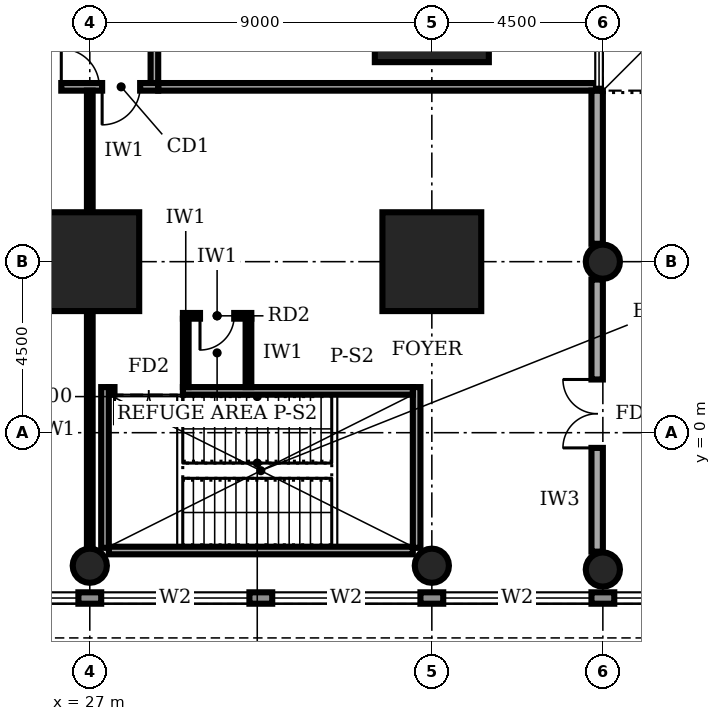
"""IFC4 building model, lengths in metres.
Left out: names, types, materials, properties, quantities, classifications, styles, units other than length and angle.
Written with IfcOpenShell. Run it as: python <this file> out.ifc"""

import sys

from ifc_helpers import new_model, si_unit, direction, frame, frame_2d, origin, origin_2d, place, context, subcontext, project, spatial, rectangle, circle, extrude, element, fill, save


model = new_model("IFC4")
c1 = context("Model", 3, precision=1e-05, world=origin(), true_north=direction((0.0, 1.0)))
c2 = subcontext(c1, "Body", "Model", "MODEL_VIEW")
j1 = project(units=[si_unit("LENGTHUNIT", "METRE"), si_unit("PLANEANGLEUNIT", "RADIAN")], contexts=[c1])
p1 = place(None, origin())
s1 = spatial("IfcSite", under=j1, at=p1, CompositionType="ELEMENT")
p2 = place(p1, origin())
s2 = spatial("IfcBuilding", under=s1, at=p2, CompositionType="ELEMENT")
p3 = place(p2, frame((0.0, 0.0, 6.0)))
s3 = spatial("IfcBuildingStorey", under=s2, at=p3, CompositionType="ELEMENT", Elevation=6.0)
for number, where, z_axis, x_axis in (
    (1, (27.0, 4.5, 0.0), (0.0, 0.0, 1.0), (1.0, 0.0, 0.0)),
    (2, (36.0, 4.5, 0.0), (0.0, 0.0, 1.0), (1.0, 0.0, 0.0)),
):
    element("IfcColumn", number, at=place(p3, frame(where, z_axis=z_axis, x_axis=x_axis)), inside=s3, PredefinedType="COLUMN", context=c2, shape_type="SweptSolid", body=[
        extrude(rectangle(XDim=2.6, YDim=2.6, at=origin_2d()), origin(), (0.0, 0.0, 1.0), 5.0),
    ])
p4 = place(p3, frame((36.0, 11.25, 0.0), z_axis=(0.0, 0.0, 1.0), x_axis=(1.0, 0.0, 0.0)))
e3 = element("IfcColumn", 3, at=p4, inside=s3, PredefinedType="COLUMN", context=c2, shape_type="SweptSolid", body=[
    extrude(rectangle(XDim=3.0, YDim=3.0, at=origin_2d()), origin(), (0.0, 0.0, 1.0), 5.0),
])
for number, where, z_axis, x_axis in (
    (4, (27.0, -3.5, 0.0), (0.0, 0.0, 1.0), (1.0, 0.0, 0.0)),
    (5, (36.0, -3.5, 0.0), (0.0, 0.0, 1.0), (1.0, 0.0, 0.0)),
    (6, (40.5, -3.6, 0.0), (0.0, 0.0, 1.0), (1.0, 0.0, 0.0)),
    (7, (40.5, 4.5, 0.0), (0.0, 0.0, 1.0), (1.0, 0.0, 0.0)),
):
    element("IfcColumn", number, at=place(p3, frame(where, z_axis=z_axis, x_axis=x_axis)), inside=s3, PredefinedType="COLUMN", context=c2, shape_type="SweptSolid", body=[
        extrude(circle(Radius=0.45, at=origin_2d()), origin(), (0.0, 0.0, 1.0), 5.0),
    ])
p5 = place(p3, frame((0.02, -4.35, 0.0), z_axis=(0.0, 0.0, 1.0), x_axis=(1.0, 0.0, 0.0)))
e8 = element("IfcWall", 8, at=p5, inside=s3, PredefinedType="STANDARD", context=c2, shape_type="SweptSolid", body=[
    extrude(rectangle(XDim=98.96, YDim=0.3, at=frame_2d((49.48, 0.0))), origin(), (0.0, 0.0, 1.0), 4.7),
])
p6 = place(p5, frame((4.78, 0.0, 0.6)))
e9 = element("IfcOpeningElement", 9, at=p6, cuts=e8, PredefinedType="OPENING", context=c2, shape_type="SweptSolid", body=[
    extrude(rectangle(XDim=3.9, YDim=2.6, at=frame_2d((1.95, 1.3))), frame((0.0, 0.16, 0.0), z_axis=(0.0, -1.0, 0.0), x_axis=(1.0, 0.0, 0.0)), (0.0, 0.0, 1.0), 0.32),
])
p7 = place(p5, frame((9.28, 0.0, 0.6)))
e10 = element("IfcOpeningElement", 10, at=p7, cuts=e8, PredefinedType="OPENING", context=c2, shape_type="SweptSolid", body=[
    extrude(rectangle(XDim=3.9, YDim=2.6, at=frame_2d((1.95, 1.3))), frame((0.0, 0.16, 0.0), z_axis=(0.0, -1.0, 0.0), x_axis=(1.0, 0.0, 0.0)), (0.0, 0.0, 1.0), 0.32),
])
p8 = place(p5, frame((13.78, 0.0, 0.6)))
e11 = element("IfcOpeningElement", 11, at=p8, cuts=e8, PredefinedType="OPENING", context=c2, shape_type="SweptSolid", body=[
    extrude(rectangle(XDim=3.9, YDim=2.6, at=frame_2d((1.95, 1.3))), frame((0.0, 0.16, 0.0), z_axis=(0.0, -1.0, 0.0), x_axis=(1.0, 0.0, 0.0)), (0.0, 0.0, 1.0), 0.32),
])
p9 = place(p5, frame((18.28, 0.0, 0.6)))
e12 = element("IfcOpeningElement", 12, at=p9, cuts=e8, PredefinedType="OPENING", context=c2, shape_type="SweptSolid", body=[
    extrude(rectangle(XDim=3.9, YDim=2.6, at=frame_2d((1.95, 1.3))), frame((0.0, 0.16, 0.0), z_axis=(0.0, -1.0, 0.0), x_axis=(1.0, 0.0, 0.0)), (0.0, 0.0, 1.0), 0.32),
])
p10 = place(p5, frame((22.78, 0.0, 0.6)))
e13 = element("IfcOpeningElement", 13, at=p10, cuts=e8, PredefinedType="OPENING", context=c2, shape_type="SweptSolid", body=[
    extrude(rectangle(XDim=3.9, YDim=2.6, at=frame_2d((1.95, 1.3))), frame((0.0, 0.16, 0.0), z_axis=(0.0, -1.0, 0.0), x_axis=(1.0, 0.0, 0.0)), (0.0, 0.0, 1.0), 0.32),
])
p11 = place(p5, frame((27.28, 0.0, 0.6)))
e14 = element("IfcOpeningElement", 14, at=p11, cuts=e8, PredefinedType="OPENING", context=c2, shape_type="SweptSolid", body=[
    extrude(rectangle(XDim=3.9, YDim=2.6, at=frame_2d((1.95, 1.3))), frame((0.0, 0.16, 0.0), z_axis=(0.0, -1.0, 0.0), x_axis=(1.0, 0.0, 0.0)), (0.0, 0.0, 1.0), 0.32),
])
p12 = place(p5, frame((31.78, 0.0, 0.6)))
e15 = element("IfcOpeningElement", 15, at=p12, cuts=e8, PredefinedType="OPENING", context=c2, shape_type="SweptSolid", body=[
    extrude(rectangle(XDim=3.9, YDim=2.6, at=frame_2d((1.95, 1.3))), frame((0.0, 0.16, 0.0), z_axis=(0.0, -1.0, 0.0), x_axis=(1.0, 0.0, 0.0)), (0.0, 0.0, 1.0), 0.32),
])
p13 = place(p5, frame((36.28, 0.0, 0.6)))
e16 = element("IfcOpeningElement", 16, at=p13, cuts=e8, PredefinedType="OPENING", context=c2, shape_type="SweptSolid", body=[
    extrude(rectangle(XDim=3.9, YDim=2.6, at=frame_2d((1.95, 1.3))), frame((0.0, 0.16, 0.0), z_axis=(0.0, -1.0, 0.0), x_axis=(1.0, 0.0, 0.0)), (0.0, 0.0, 1.0), 0.32),
])
p14 = place(p5, frame((40.78, 0.0, 0.6)))
e17 = element("IfcOpeningElement", 17, at=p14, cuts=e8, PredefinedType="OPENING", context=c2, shape_type="SweptSolid", body=[
    extrude(rectangle(XDim=3.9, YDim=2.6, at=frame_2d((1.95, 1.3))), frame((0.0, 0.16, 0.0), z_axis=(0.0, -1.0, 0.0), x_axis=(1.0, 0.0, 0.0)), (0.0, 0.0, 1.0), 0.32),
])
p15 = place(p5, frame((45.28, 0.0, 0.6)))
e18 = element("IfcOpeningElement", 18, at=p15, cuts=e8, PredefinedType="OPENING", context=c2, shape_type="SweptSolid", body=[
    extrude(rectangle(XDim=3.9, YDim=2.6, at=frame_2d((1.95, 1.3))), frame((0.0, 0.16, 0.0), z_axis=(0.0, -1.0, 0.0), x_axis=(1.0, 0.0, 0.0)), (0.0, 0.0, 1.0), 0.32),
])
p16 = place(p5, frame((49.78, 0.0, 0.6)))
e19 = element("IfcOpeningElement", 19, at=p16, cuts=e8, PredefinedType="OPENING", context=c2, shape_type="SweptSolid", body=[
    extrude(rectangle(XDim=3.9, YDim=2.6, at=frame_2d((1.95, 1.3))), frame((0.0, 0.16, 0.0), z_axis=(0.0, -1.0, 0.0), x_axis=(1.0, 0.0, 0.0)), (0.0, 0.0, 1.0), 0.32),
])
p17 = place(p5, frame((54.28, 0.0, 0.6)))
e20 = element("IfcOpeningElement", 20, at=p17, cuts=e8, PredefinedType="OPENING", context=c2, shape_type="SweptSolid", body=[
    extrude(rectangle(XDim=3.9, YDim=2.6, at=frame_2d((1.95, 1.3))), frame((0.0, 0.16, 0.0), z_axis=(0.0, -1.0, 0.0), x_axis=(1.0, 0.0, 0.0)), (0.0, 0.0, 1.0), 0.32),
])
p18 = place(p5, frame((58.78, 0.0, 0.6)))
e21 = element("IfcOpeningElement", 21, at=p18, cuts=e8, PredefinedType="OPENING", context=c2, shape_type="SweptSolid", body=[
    extrude(rectangle(XDim=3.9, YDim=2.6, at=frame_2d((1.95, 1.3))), frame((0.0, 0.16, 0.0), z_axis=(0.0, -1.0, 0.0), x_axis=(1.0, 0.0, 0.0)), (0.0, 0.0, 1.0), 0.32),
])
p19 = place(p5, frame((63.28, 0.0, 0.6)))
e22 = element("IfcOpeningElement", 22, at=p19, cuts=e8, PredefinedType="OPENING", context=c2, shape_type="SweptSolid", body=[
    extrude(rectangle(XDim=3.9, YDim=2.6, at=frame_2d((1.95, 1.3))), frame((0.0, 0.16, 0.0), z_axis=(0.0, -1.0, 0.0), x_axis=(1.0, 0.0, 0.0)), (0.0, 0.0, 1.0), 0.32),
])
p20 = place(p5, frame((67.78, 0.0, 0.6)))
e23 = element("IfcOpeningElement", 23, at=p20, cuts=e8, PredefinedType="OPENING", context=c2, shape_type="SweptSolid", body=[
    extrude(rectangle(XDim=3.9, YDim=2.6, at=frame_2d((1.95, 1.3))), frame((0.0, 0.16, 0.0), z_axis=(0.0, -1.0, 0.0), x_axis=(1.0, 0.0, 0.0)), (0.0, 0.0, 1.0), 0.32),
])
p21 = place(p5, frame((72.28, 0.0, 0.6)))
e24 = element("IfcOpeningElement", 24, at=p21, cuts=e8, PredefinedType="OPENING", context=c2, shape_type="SweptSolid", body=[
    extrude(rectangle(XDim=3.9, YDim=2.6, at=frame_2d((1.95, 1.3))), frame((0.0, 0.16, 0.0), z_axis=(0.0, -1.0, 0.0), x_axis=(1.0, 0.0, 0.0)), (0.0, 0.0, 1.0), 0.32),
])
p22 = place(p5, frame((76.78, 0.0, 0.6)))
e25 = element("IfcOpeningElement", 25, at=p22, cuts=e8, PredefinedType="OPENING", context=c2, shape_type="SweptSolid", body=[
    extrude(rectangle(XDim=3.9, YDim=2.6, at=frame_2d((1.95, 1.3))), frame((0.0, 0.16, 0.0), z_axis=(0.0, -1.0, 0.0), x_axis=(1.0, 0.0, 0.0)), (0.0, 0.0, 1.0), 0.32),
])
p23 = place(p5, frame((81.28, 0.0, 0.6)))
e26 = element("IfcOpeningElement", 26, at=p23, cuts=e8, PredefinedType="OPENING", context=c2, shape_type="SweptSolid", body=[
    extrude(rectangle(XDim=3.9, YDim=2.6, at=frame_2d((1.95, 1.3))), frame((0.0, 0.16, 0.0), z_axis=(0.0, -1.0, 0.0), x_axis=(1.0, 0.0, 0.0)), (0.0, 0.0, 1.0), 0.32),
])
p24 = place(p5, frame((85.78, 0.0, 0.6)))
e27 = element("IfcOpeningElement", 27, at=p24, cuts=e8, PredefinedType="OPENING", context=c2, shape_type="SweptSolid", body=[
    extrude(rectangle(XDim=3.9, YDim=2.6, at=frame_2d((1.95, 1.3))), frame((0.0, 0.16, 0.0), z_axis=(0.0, -1.0, 0.0), x_axis=(1.0, 0.0, 0.0)), (0.0, 0.0, 1.0), 0.32),
])
p25 = place(p5, frame((90.28, 0.0, 0.6)))
e28 = element("IfcOpeningElement", 28, at=p25, cuts=e8, PredefinedType="OPENING", context=c2, shape_type="SweptSolid", body=[
    extrude(rectangle(XDim=3.9, YDim=2.6, at=frame_2d((1.95, 1.3))), frame((0.0, 0.16, 0.0), z_axis=(0.0, -1.0, 0.0), x_axis=(1.0, 0.0, 0.0)), (0.0, 0.0, 1.0), 0.32),
])
p26 = place(p5, frame((94.78, 0.0, 0.6)))
e29 = element("IfcOpeningElement", 29, at=p26, cuts=e8, PredefinedType="OPENING", context=c2, shape_type="SweptSolid", body=[
    extrude(rectangle(XDim=3.9, YDim=2.6, at=frame_2d((1.95, 1.3))), frame((0.0, 0.16, 0.0), z_axis=(0.0, -1.0, 0.0), x_axis=(1.0, 0.0, 0.0)), (0.0, 0.0, 1.0), 0.32),
])
p27 = place(p3, frame((11.9, 9.1, 0.0), z_axis=(0.0, 0.0, 1.0), x_axis=(1.0, 0.0, 0.0)))
e30 = element("IfcWall", 30, at=p27, inside=s3, PredefinedType="SOLIDWALL", context=c2, shape_type="SweptSolid", body=[
    extrude(rectangle(XDim=16.9, YDim=0.2, at=frame_2d((8.45, 0.0))), origin(), (0.0, 0.0, 1.0), 4.7),
])
p28 = place(p27, frame((0.1, 0.0, 0.0)))
e31 = element("IfcOpeningElement", 31, at=p28, cuts=e30, PredefinedType="OPENING", context=c2, shape_type="SweptSolid", body=[
    extrude(rectangle(XDim=1.2, YDim=2.4, at=frame_2d((0.6, 1.2))), frame((0.0, 0.11, 0.0), z_axis=(0.0, -1.0, 0.0), x_axis=(1.0, 0.0, 0.0)), (0.0, 0.0, 1.0), 0.22),
])
p29 = place(p27, frame((2.35, 0.0, 0.0)))
e32 = element("IfcOpeningElement", 32, at=p29, cuts=e30, PredefinedType="OPENING", context=c2, shape_type="SweptSolid", body=[
    extrude(rectangle(XDim=2.0, YDim=2.4, at=frame_2d((1.0, 1.2))), frame((0.0, 0.11, 0.0), z_axis=(0.0, -1.0, 0.0), x_axis=(1.0, 0.0, 0.0)), (0.0, 0.0, 1.0), 0.22),
])
p30 = place(p27, frame((12.35, 0.0, 0.0)))
e33 = element("IfcOpeningElement", 33, at=p30, cuts=e30, PredefinedType="OPENING", context=c2, shape_type="SweptSolid", body=[
    extrude(rectangle(XDim=2.0, YDim=2.4, at=frame_2d((1.0, 1.2))), frame((0.0, 0.11, 0.0), z_axis=(0.0, -1.0, 0.0), x_axis=(1.0, 0.0, 0.0)), (0.0, 0.0, 1.0), 0.22),
])
p31 = place(p27, frame((15.425, 0.0, 0.0)))
e34 = element("IfcOpeningElement", 34, at=p31, cuts=e30, PredefinedType="OPENING", context=c2, shape_type="SweptSolid", body=[
    extrude(rectangle(XDim=1.0, YDim=2.1, at=frame_2d((0.5, 1.05))), frame((0.0, 0.11, 0.0), z_axis=(0.0, -1.0, 0.0), x_axis=(1.0, 0.0, 0.0)), (0.0, 0.0, 1.0), 0.22),
])
p32 = place(p3, frame((28.7, 9.2, 0.0), z_axis=(0.0, 0.0, 1.0), x_axis=(0.0, 1.0, 0.0)))
e35 = element("IfcWall", 35, at=p32, inside=s3, PredefinedType="SOLIDWALL", context=c2, shape_type="SweptSolid", body=[
    extrude(rectangle(XDim=22.3, YDim=0.2, at=frame_2d((11.15, 0.0))), origin(), (0.0, 0.0, 1.0), 4.7),
])
p33 = place(p32, frame((1.55, 0.0, 0.0)))
e36 = element("IfcOpeningElement", 36, at=p33, cuts=e35, PredefinedType="OPENING", context=c2, shape_type="SweptSolid", body=[
    extrude(rectangle(XDim=1.0, YDim=2.1, at=frame_2d((0.5, 1.05))), frame((0.0, 0.11, 0.0), z_axis=(0.0, -1.0, 0.0), x_axis=(1.0, 0.0, 0.0)), (0.0, 0.0, 1.0), 0.22),
])
p34 = place(p32, frame((7.9, 0.0, 0.0)))
e37 = element("IfcOpeningElement", 37, at=p34, cuts=e35, PredefinedType="OPENING", context=c2, shape_type="SweptSolid", body=[
    extrude(rectangle(XDim=1.8, YDim=2.1, at=frame_2d((0.9, 1.05))), frame((0.0, 0.11, 0.0), z_axis=(0.0, -1.0, 0.0), x_axis=(1.0, 0.0, 0.0)), (0.0, 0.0, 1.0), 0.22),
])
p35 = place(p32, frame((16.9, 0.0, 0.0)))
e38 = element("IfcOpeningElement", 38, at=p35, cuts=e35, PredefinedType="OPENING", context=c2, shape_type="SweptSolid", body=[
    extrude(rectangle(XDim=1.8, YDim=2.1, at=frame_2d((0.9, 1.05))), frame((0.0, 0.11, 0.0), z_axis=(0.0, -1.0, 0.0), x_axis=(1.0, 0.0, 0.0)), (0.0, 0.0, 1.0), 0.22),
])
p36 = place(p3, frame((28.8, 9.1, 0.0), z_axis=(0.0, 0.0, 1.0), x_axis=(1.0, 0.0, 0.0)))
e39 = element("IfcWall", 39, at=p36, inside=s3, PredefinedType="SOLIDWALL", context=c2, shape_type="SweptSolid", body=[
    extrude(rectangle(XDim=11.52, YDim=0.2, at=frame_2d((5.76, 0.0))), origin(), (0.0, 0.0, 1.0), 4.7),
])
p37 = place(p3, frame((27.0, -3.03, 0.0), z_axis=(0.0, 0.0, 1.0), x_axis=(0.0, 1.0, 0.0)))
e40 = element("IfcWall", 40, at=p37, inside=s3, PredefinedType="PARTITIONING", context=c2, shape_type="SweptSolid", body=[
    extrude(rectangle(XDim=6.21, YDim=0.15, at=frame_2d((3.105, 0.0))), origin(), (0.0, 0.0, 1.0), 3.7),
])
p38 = place(p3, frame((27.0, 5.82, 0.0), z_axis=(0.0, 0.0, 1.0), x_axis=(0.0, 1.0, 0.0)))
e41 = element("IfcWall", 41, at=p38, inside=s3, PredefinedType="PARTITIONING", context=c2, shape_type="SweptSolid", body=[
    extrude(rectangle(XDim=3.18, YDim=0.15, at=frame_2d((1.59, 0.0))), origin(), (0.0, 0.0, 1.0), 3.8),
])
p39 = place(p3, frame((27.5, 1.1, 0.0), z_axis=(0.0, 0.0, 1.0), x_axis=(1.0, 0.0, 0.0)))
e42 = element("IfcWall", 42, at=p39, inside=s3, PredefinedType="SOLIDWALL", context=c2, shape_type="SweptSolid", body=[
    extrude(rectangle(XDim=8.0, YDim=0.2, at=frame_2d((4.0, 0.0))), origin(), (0.0, 0.0, 1.0), 4.7),
])
p40 = place(p39, frame((0.15, 0.0, 0.0)))
e43 = element("IfcOpeningElement", 43, at=p40, cuts=e42, PredefinedType="OPENING", context=c2, shape_type="SweptSolid", body=[
    extrude(rectangle(XDim=1.8, YDim=2.1, at=frame_2d((0.9, 1.05))), frame((0.0, 0.11, 0.0), z_axis=(0.0, -1.0, 0.0), x_axis=(1.0, 0.0, 0.0)), (0.0, 0.0, 1.0), 0.22),
])
p41 = place(p3, frame((27.5, -3.1, 0.0), z_axis=(0.0, 0.0, 1.0), x_axis=(1.0, 0.0, 0.0)))
e44 = element("IfcWall", 44, at=p41, inside=s3, PredefinedType="SOLIDWALL", context=c2, shape_type="SweptSolid", body=[
    extrude(rectangle(XDim=8.0, YDim=0.2, at=frame_2d((4.0, 0.0))), origin(), (0.0, 0.0, 1.0), 4.7),
])
for number, where, z_axis, x_axis in (
    (45, (27.4, -3.03, 0.0), (0.0, 0.0, 1.0), (0.0, 1.0, 0.0)),
    (46, (35.6, -3.03, 0.0), (0.0, 0.0, 1.0), (0.0, 1.0, 0.0)),
):
    element("IfcWall", number, at=place(p3, frame(where, z_axis=z_axis, x_axis=x_axis)), inside=s3, PredefinedType="SOLIDWALL", context=c2, shape_type="SweptSolid", body=[
        extrude(rectangle(XDim=4.23, YDim=0.2, at=frame_2d((2.115, 0.0))), origin(), (0.0, 0.0, 1.0), 4.7),
    ])
p42 = place(p3, frame((40.35, -3.13, 0.0), z_axis=(0.0, 0.0, 1.0), x_axis=(0.0, 1.0, 0.0)))
e47 = element("IfcWall", 47, at=p42, inside=s3, PredefinedType="SOLIDWALL", context=c2, shape_type="SweptSolid", body=[
    extrude(rectangle(XDim=7.16, YDim=0.3, at=frame_2d((3.58, 0.0))), origin(), (0.0, 0.0, 1.0), 3.7),
])
p43 = place(p42, frame((2.73, 0.0, 0.0)))
e48 = element("IfcOpeningElement", 48, at=p43, cuts=e47, PredefinedType="OPENING", context=c2, shape_type="SweptSolid", body=[
    extrude(rectangle(XDim=1.8, YDim=2.1, at=frame_2d((0.9, 1.05))), frame((0.0, 0.16, 0.0), z_axis=(0.0, -1.0, 0.0), x_axis=(1.0, 0.0, 0.0)), (0.0, 0.0, 1.0), 0.32),
])
p44 = place(p3, frame((40.35, 4.97, 0.0), z_axis=(0.0, 0.0, 1.0), x_axis=(0.0, 1.0, 0.0)))
e49 = element("IfcWall", 49, at=p44, inside=s3, PredefinedType="SOLIDWALL", context=c2, shape_type="SweptSolid", body=[
    extrude(rectangle(XDim=4.03, YDim=0.3, at=frame_2d((2.015, 0.0))), origin(), (0.0, 0.0, 1.0), 4.7),
])
p45 = place(p3, frame((31.175, 1.2, 0.0), z_axis=(0.0, 0.0, 1.0), x_axis=(0.0, 1.0, 0.0)))
e50 = element("IfcWall", 50, at=p45, inside=s3, PredefinedType="PARTITIONING", context=c2, shape_type="SweptSolid", body=[
    extrude(rectangle(XDim=1.8, YDim=0.15, at=frame_2d((0.9, 0.0))), origin(), (0.0, 0.0, 1.0), 4.7),
])
p46 = place(p3, frame((29.45, 3.075, 0.0), z_axis=(0.0, 0.0, 1.0), x_axis=(1.0, 0.0, 0.0)))
e51 = element("IfcWall", 51, at=p46, inside=s3, PredefinedType="PARTITIONING", context=c2, shape_type="SweptSolid", body=[
    extrude(rectangle(XDim=1.8, YDim=0.15, at=frame_2d((0.9, 0.0))), origin(), (0.0, 0.0, 1.0), 4.7),
])
p47 = place(p46, frame((0.45, 0.0, 0.0)))
e52 = element("IfcOpeningElement", 52, at=p47, cuts=e51, PredefinedType="OPENING", context=c2, shape_type="SweptSolid", body=[
    extrude(rectangle(XDim=0.9, YDim=2.1, at=frame_2d((0.45, 1.05))), frame((0.0, 0.085, 0.0), z_axis=(0.0, -1.0, 0.0), x_axis=(1.0, 0.0, 0.0)), (0.0, 0.0, 1.0), 0.17),
])
p48 = place(p3, frame((29.525, 1.2, 0.0), z_axis=(0.0, 0.0, 1.0), x_axis=(0.0, 1.0, 0.0)))
e53 = element("IfcWall", 53, at=p48, inside=s3, PredefinedType="PARTITIONING", context=c2, shape_type="SweptSolid", body=[
    extrude(rectangle(XDim=1.8, YDim=0.15, at=frame_2d((0.9, 0.0))), origin(), (0.0, 0.0, 1.0), 4.7),
])
p49 = place(p10, origin())
e54 = element("IfcWindow", 54, at=p49, inside=s3, PartitioningType="SINGLE_PANEL", PredefinedType="WINDOW", context=c2, shape_type="SweptSolid", body=[
    extrude(rectangle(XDim=3.9, YDim=2.6, at=frame_2d((1.95, 1.3))), frame((0.0, 0.03, 0.0), z_axis=(0.0, -1.0, 0.0), x_axis=(1.0, 0.0, 0.0)), (0.0, 0.0, 1.0), 0.06),
])
fill(e13, e54)
p50 = place(p11, origin())
e55 = element("IfcWindow", 55, at=p50, inside=s3, PartitioningType="SINGLE_PANEL", PredefinedType="WINDOW", context=c2, shape_type="SweptSolid", body=[
    extrude(rectangle(XDim=3.9, YDim=2.6, at=frame_2d((1.95, 1.3))), frame((0.0, 0.03, 0.0), z_axis=(0.0, -1.0, 0.0), x_axis=(1.0, 0.0, 0.0)), (0.0, 0.0, 1.0), 0.06),
])
fill(e14, e55)
p51 = place(p12, origin())
e56 = element("IfcWindow", 56, at=p51, inside=s3, PartitioningType="SINGLE_PANEL", PredefinedType="WINDOW", context=c2, shape_type="SweptSolid", body=[
    extrude(rectangle(XDim=3.9, YDim=2.6, at=frame_2d((1.95, 1.3))), frame((0.0, 0.03, 0.0), z_axis=(0.0, -1.0, 0.0), x_axis=(1.0, 0.0, 0.0)), (0.0, 0.0, 1.0), 0.06),
])
fill(e15, e56)
p52 = place(p13, origin())
e57 = element("IfcWindow", 57, at=p52, inside=s3, PartitioningType="SINGLE_PANEL", PredefinedType="WINDOW", context=c2, shape_type="SweptSolid", body=[
    extrude(rectangle(XDim=3.9, YDim=2.6, at=frame_2d((1.95, 1.3))), frame((0.0, 0.03, 0.0), z_axis=(0.0, -1.0, 0.0), x_axis=(1.0, 0.0, 0.0)), (0.0, 0.0, 1.0), 0.06),
])
fill(e16, e57)
p53 = place(p14, origin())
e58 = element("IfcWindow", 58, at=p53, inside=s3, PartitioningType="SINGLE_PANEL", PredefinedType="WINDOW", context=c2, shape_type="SweptSolid", body=[
    extrude(rectangle(XDim=3.9, YDim=2.6, at=frame_2d((1.95, 1.3))), frame((0.0, 0.03, 0.0), z_axis=(0.0, -1.0, 0.0), x_axis=(1.0, 0.0, 0.0)), (0.0, 0.0, 1.0), 0.06),
])
fill(e17, e58)
p54 = place(p30, origin())
e59 = element("IfcDoor", 59, at=p54, inside=s3, OperationType="DOUBLE_DOOR_SINGLE_SWING", PredefinedType="DOOR", context=c2, shape_type="SweptSolid", body=[
    extrude(rectangle(XDim=2.0, YDim=2.4, at=frame_2d((1.0, 1.2))), frame((0.0, 0.025, 0.0), z_axis=(0.0, -1.0, 0.0), x_axis=(1.0, 0.0, 0.0)), (0.0, 0.0, 1.0), 0.05),
])
fill(e33, e59)
p55 = place(p31, frame((1.0, 0.0, 0.0), z_axis=(0.0, 0.0, 1.0), x_axis=(-1.0, 0.0, 0.0)))
e60 = element("IfcDoor", 60, at=p55, inside=s3, OperationType="SINGLE_SWING_RIGHT", PredefinedType="DOOR", context=c2, shape_type="SweptSolid", body=[
    extrude(rectangle(XDim=1.0, YDim=2.1, at=frame_2d((0.5, 1.05))), frame((0.0, 0.025, 0.0), z_axis=(0.0, -1.0, 0.0), x_axis=(1.0, 0.0, 0.0)), (0.0, 0.0, 1.0), 0.05),
])
fill(e34, e60)
p56 = place(p40, frame((1.8, 0.0, 0.0), z_axis=(0.0, 0.0, 1.0), x_axis=(-1.0, 0.0, 0.0)))
e61 = element("IfcDoor", 61, at=p56, inside=s3, OperationType="DOUBLE_DOOR_SINGLE_SWING", PredefinedType="DOOR", context=c2, shape_type="SweptSolid", body=[
    extrude(rectangle(XDim=1.8, YDim=2.1, at=frame_2d((0.9, 1.05))), frame((0.0, 0.025, 0.0), z_axis=(0.0, -1.0, 0.0), x_axis=(1.0, 0.0, 0.0)), (0.0, 0.0, 1.0), 0.05),
])
fill(e43, e61)
p57 = place(p43, origin())
e62 = element("IfcDoor", 62, at=p57, inside=s3, OperationType="DOUBLE_DOOR_SINGLE_SWING", PredefinedType="DOOR", context=c2, shape_type="SweptSolid", body=[
    extrude(rectangle(XDim=1.8, YDim=2.1, at=frame_2d((0.9, 1.05))), frame((0.0, 0.025, 0.0), z_axis=(0.0, -1.0, 0.0), x_axis=(1.0, 0.0, 0.0)), (0.0, 0.0, 1.0), 0.05),
])
fill(e48, e62)
p58 = place(p47, frame((0.9, 0.0, 0.0), z_axis=(0.0, 0.0, 1.0), x_axis=(-1.0, 0.0, 0.0)))
e63 = element("IfcDoor", 63, at=p58, inside=s3, OperationType="SINGLE_SWING_RIGHT", PredefinedType="DOOR", context=c2, shape_type="SweptSolid", body=[
    extrude(rectangle(XDim=0.9, YDim=2.1, at=frame_2d((0.45, 1.05))), frame((0.0, 0.025, 0.0), z_axis=(0.0, -1.0, 0.0), x_axis=(1.0, 0.0, 0.0)), (0.0, 0.0, 1.0), 0.05),
])
fill(e52, e63)
save(model, sys.argv[1])
